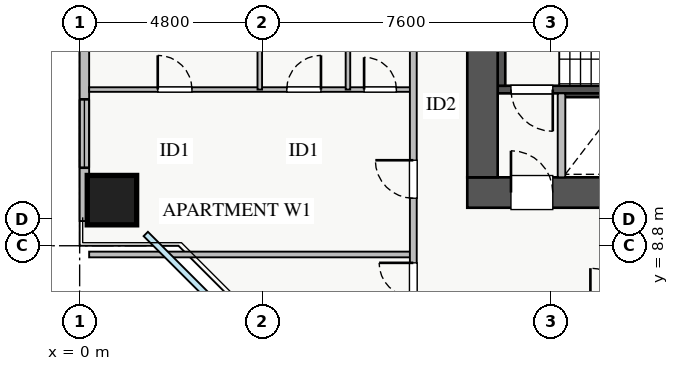
"""IFC4 building model, lengths in metres.
Left out: names, types, materials, properties, quantities, classifications, styles, units other than length and angle.
Written with IfcOpenShell. Run it as: python <this file> out.ifc"""

import sys

from ifc_helpers import new_model, si_unit, direction, frame, frame_2d, origin, origin_2d, place, context, subcontext, project, spatial, rectangle, extrude, source, transform, mapped, element, fill, save


model = new_model("IFC4")
c1 = context("Model", 3, precision=1e-05, world=origin(), true_north=direction((0.0, 1.0)))
c2 = subcontext(c1, "Body", "Model", "MODEL_VIEW")
j1 = project(units=[si_unit("LENGTHUNIT", "METRE"), si_unit("PLANEANGLEUNIT", "RADIAN")], contexts=[c1])
p1 = place(None, origin())
s1 = spatial("IfcSite", under=j1, at=p1, CompositionType="ELEMENT")
p2 = place(p1, origin())
s2 = spatial("IfcBuilding", under=s1, at=p2, CompositionType="ELEMENT")
p3 = place(p2, frame((0.0, 0.0, 73.0)))
s3 = spatial("IfcBuildingStorey", under=s2, at=p3, CompositionType="ELEMENT", Elevation=73.0)
p4 = place(p3, frame((12.68, 12.8, 0.0), z_axis=(0.0, 0.0, 1.0), x_axis=(1.0, 0.0, 0.0)))
e1 = element("IfcWall", 1, at=p4, inside=s3, PredefinedType="SHEAR", context=c2, shape_type="SweptSolid", body=[
    extrude(rectangle(XDim=1.94, YDim=0.18, at=frame_2d((0.97, 0.0))), origin(), (0.0, 0.0, 1.0), 3.07),
])
p5 = place(p3, frame((11.0, 12.91, 0.0), z_axis=(0.0, 0.0, 1.0), x_axis=(1.0, 0.0, 0.0)))
e2 = element("IfcWall", 2, at=p5, inside=s3, PredefinedType="SHEAR", context=c2, shape_type="SweptSolid", body=[
    extrude(rectangle(XDim=7.15, YDim=0.2, at=frame_2d((3.575, 0.0))), origin(), (0.0, 0.0, 1.0), 3.25),
])
p6 = place(p5, frame((0.35, 0.0, 0.0)))
e3 = element("IfcOpeningElement", 3, at=p6, cuts=e2, PredefinedType="OPENING", context=c2, shape_type="SweptSolid", body=[
    extrude(rectangle(XDim=1.1, YDim=2.05, at=frame_2d((0.55, 1.025))), frame((0.0, 0.11, 0.0), z_axis=(0.0, -1.0, 0.0), x_axis=(1.0, 0.0, 0.0)), (0.0, 0.0, 1.0), 0.22),
])
p7 = place(p3, frame((11.1, 13.01, 0.0), z_axis=(0.0, 0.0, 1.0), x_axis=(0.0, 1.0, 0.0)))
e4 = element("IfcWall", 4, at=p7, inside=s3, PredefinedType="SHEAR", context=c2, shape_type="SweptSolid", body=[
    extrude(rectangle(XDim=2.94, YDim=0.2, at=frame_2d((1.47, 0.0))), origin(), (0.0, 0.0, 1.0), 3.25),
])
p8 = place(p3, frame((10.2, 10.2, 0.0), z_axis=(0.0, 0.0, 1.0), x_axis=(1.0, 0.0, 0.0)))
e5 = element("IfcWall", 5, at=p8, inside=s3, PredefinedType="SHEAR", context=c2, shape_type="SweptSolid", body=[
    extrude(rectangle(XDim=17.6, YDim=0.8, at=frame_2d((8.8, 0.0))), origin(), (0.0, 0.0, 1.0), 3.25),
])
p9 = place(p8, frame((1.15, 0.0, 0.0)))
e6 = element("IfcOpeningElement", 6, at=p9, cuts=e5, PredefinedType="OPENING", context=c2, shape_type="SweptSolid", body=[
    extrude(rectangle(XDim=1.1, YDim=2.05, at=frame_2d((0.55, 1.025))), frame((0.0, 0.41, 0.0), z_axis=(0.0, -1.0, 0.0), x_axis=(1.0, 0.0, 0.0)), (0.0, 0.0, 1.0), 0.82),
])
p10 = place(p8, frame((8.3, 0.0, 0.0)))
e7 = element("IfcOpeningElement", 7, at=p10, cuts=e5, PredefinedType="OPENING", context=c2, shape_type="SweptSolid", body=[
    extrude(rectangle(XDim=1.1, YDim=2.05, at=frame_2d((0.55, 1.025))), frame((0.0, 0.41, 0.0), z_axis=(0.0, -1.0, 0.0), x_axis=(1.0, 0.0, 0.0)), (0.0, 0.0, 1.0), 0.82),
])
p11 = place(p8, frame((10.05, 0.0, 0.0)))
e8 = element("IfcOpeningElement", 8, at=p11, cuts=e5, PredefinedType="OPENING", context=c2, shape_type="SweptSolid", body=[
    extrude(rectangle(XDim=1.1, YDim=2.05, at=frame_2d((0.55, 1.025))), frame((0.0, 0.41, 0.0), z_axis=(0.0, -1.0, 0.0), x_axis=(1.0, 0.0, 0.0)), (0.0, 0.0, 1.0), 0.82),
])
p12 = place(p8, frame((14.74, 0.0, 0.0)))
e9 = element("IfcOpeningElement", 9, at=p12, cuts=e5, PredefinedType="OPENING", context=c2, shape_type="SweptSolid", body=[
    extrude(rectangle(XDim=1.0, YDim=2.05, at=frame_2d((0.5, 1.025))), frame((0.0, 0.41, 0.0), z_axis=(0.0, -1.0, 0.0), x_axis=(1.0, 0.0, 0.0)), (0.0, 0.0, 1.0), 0.82),
])
p13 = place(p8, frame((11.835, 0.0, 0.0)))
e10 = element("IfcOpeningElement", 10, at=p13, cuts=e5, PredefinedType="OPENING", context=c2, shape_type="SweptSolid", body=[
    extrude(rectangle(XDim=1.0, YDim=2.05, at=frame_2d((0.5, 1.025))), frame((0.0, 0.41, 0.0), z_axis=(0.0, -1.0, 0.0), x_axis=(1.0, 0.0, 0.0)), (0.0, 0.0, 1.0), 0.82),
])
p14 = place(p8, frame((13.37, 0.0, 0.0)))
e11 = element("IfcOpeningElement", 11, at=p14, cuts=e5, PredefinedType="OPENING", context=c2, shape_type="SweptSolid", body=[
    extrude(rectangle(XDim=1.0, YDim=2.05, at=frame_2d((0.5, 1.025))), frame((0.0, 0.41, 0.0), z_axis=(0.0, -1.0, 0.0), x_axis=(1.0, 0.0, 0.0)), (0.0, 0.0, 1.0), 0.82),
])
p15 = place(p3, frame((10.6, 10.6, 0.0), z_axis=(0.0, 0.0, 1.0), x_axis=(0.0, 1.0, 0.0)))
e12 = element("IfcWall", 12, at=p15, inside=s3, PredefinedType="SHEAR", context=c2, shape_type="SweptSolid", body=[
    extrude(rectangle(XDim=5.6, YDim=0.8, at=frame_2d((2.8, 0.0))), origin(), (0.0, 0.0, 1.0), 3.25),
])
m1 = source(origin(), c2, "Body", "SweptSolid", [
    extrude(rectangle(XDim=1.3, YDim=1.3, at=origin_2d()), origin(), (0.0, 0.0, 1.0), 3.25),
])
p16 = place(p3, frame((0.85, 10.0, 0.0), z_axis=(0.0, 0.0, 1.0), x_axis=(1.0, 0.0, 0.0)))
e13 = element("IfcColumn", 13, at=p16, inside=s3, PredefinedType="COLUMN", context=c2, shape_type="MappedRepresentation", body=[
    mapped(m1, transform((0.0, 0.0, 0.0), x_axis=(1.0, 0.0, 0.0), y_axis=(0.0, 1.0, 0.0), z_axis=(0.0, 0.0, 1.0), scale=1.0)),
])
p17 = place(p3, frame((0.125, 9.45, 0.0), z_axis=(0.0, 0.0, 1.0), x_axis=(0.0, 1.0, 0.0)))
e14 = element("IfcWall", 14, at=p17, inside=s3, PredefinedType="STANDARD", context=c2, shape_type="SweptSolid", body=[
    extrude(rectangle(XDim=27.1, YDim=0.25, at=frame_2d((13.55, 0.0))), origin(), (0.0, 0.0, 1.0), 2.61),
])
p18 = place(p17, frame((14.4, 0.0, 0.0)))
e15 = element("IfcOpeningElement", 15, at=p18, cuts=e14, PredefinedType="OPENING", context=c2, shape_type="SweptSolid", body=[
    extrude(rectangle(XDim=1.2, YDim=2.1, at=frame_2d((0.6, 1.05))), frame((0.0, 0.135, 0.0), z_axis=(0.0, -1.0, 0.0), x_axis=(1.0, 0.0, 0.0)), (0.0, 0.0, 1.0), 0.27),
])
p19 = place(p17, frame((1.403, 0.0, 0.9)))
e16 = element("IfcOpeningElement", 16, at=p19, cuts=e14, PredefinedType="OPENING", context=c2, shape_type="SweptSolid", body=[
    extrude(rectangle(XDim=1.8, YDim=1.5, at=frame_2d((0.9, 0.75))), frame((0.0, 0.135, 0.0), z_axis=(0.0, -1.0, 0.0), x_axis=(1.0, 0.0, 0.0)), (0.0, 0.0, 1.0), 0.27),
])
p20 = place(p17, frame((22.663, 0.0, 0.9)))
e17 = element("IfcOpeningElement", 17, at=p20, cuts=e14, PredefinedType="OPENING", context=c2, shape_type="SweptSolid", body=[
    extrude(rectangle(XDim=2.1, YDim=1.48, at=frame_2d((1.05, 0.74))), frame((0.0, 0.135, 0.0), z_axis=(0.0, -1.0, 0.0), x_axis=(1.0, 0.0, 0.0)), (0.0, 0.0, 1.0), 0.27),
])
p21 = place(p17, frame((4.607, 0.0, 0.9)))
e18 = element("IfcOpeningElement", 18, at=p21, cuts=e14, PredefinedType="OPENING", context=c2, shape_type="SweptSolid", body=[
    extrude(rectangle(XDim=2.4, YDim=1.5, at=frame_2d((1.2, 0.75))), frame((0.0, 0.135, 0.0), z_axis=(0.0, -1.0, 0.0), x_axis=(1.0, 0.0, 0.0)), (0.0, 0.0, 1.0), 0.27),
])
p22 = place(p17, frame((13.17, 0.0, 0.9)))
e19 = element("IfcOpeningElement", 19, at=p22, cuts=e14, PredefinedType="OPENING", context=c2, shape_type="SweptSolid", body=[
    extrude(rectangle(XDim=0.9, YDim=1.2, at=frame_2d((0.45, 0.6))), frame((0.0, 0.135, 0.0), z_axis=(0.0, -1.0, 0.0), x_axis=(1.0, 0.0, 0.0)), (0.0, 0.0, 1.0), 0.27),
])
p23 = place(p17, frame((8.405, 0.0, 0.9)))
e20 = element("IfcOpeningElement", 20, at=p23, cuts=e14, PredefinedType="OPENING", context=c2, shape_type="SweptSolid", body=[
    extrude(rectangle(XDim=0.9, YDim=1.2, at=frame_2d((0.45, 0.6))), frame((0.0, 0.135, 0.0), z_axis=(0.0, -1.0, 0.0), x_axis=(1.0, 0.0, 0.0)), (0.0, 0.0, 1.0), 0.27),
])
p24 = place(p3, frame((12.68, 10.6, 0.0), z_axis=(0.0, 0.0, 1.0), x_axis=(0.0, 1.0, 0.0)))
e21 = element("IfcWall", 21, at=p24, inside=s3, PredefinedType="PARTITIONING", context=c2, shape_type="SweptSolid", body=[
    extrude(rectangle(XDim=2.21, YDim=0.2, at=frame_2d((1.105, 0.0))), origin(), (0.0, 0.0, 1.0), 3.07),
])
p25 = place(p3, frame((0.25, 8.57, 0.0), z_axis=(0.0, 0.0, 1.0), x_axis=(1.0, 0.0, 0.0)))
e22 = element("IfcWall", 22, at=p25, inside=s3, PredefinedType="PARTITIONING", context=c2, shape_type="SweptSolid", body=[
    extrude(rectangle(XDim=8.53, YDim=0.15, at=frame_2d((4.265, 0.0))), origin(), (0.0, 0.0, 1.0), 3.07),
])
p26 = place(p3, frame((0.25, 12.91, 0.0), z_axis=(0.0, 0.0, 1.0), x_axis=(1.0, 0.0, 0.0)))
e23 = element("IfcWall", 23, at=p26, inside=s3, PredefinedType="PLUMBINGWALL", context=c2, shape_type="SweptSolid", body=[
    extrude(rectangle(XDim=8.53, YDim=0.12, at=frame_2d((4.265, 0.0))), origin(), (0.0, 0.0, 1.0), 3.07),
])
p27 = place(p26, frame((1.805, 0.0, 0.0)))
e24 = element("IfcOpeningElement", 24, at=p27, cuts=e23, PredefinedType="OPENING", context=c2, shape_type="SweptSolid", body=[
    extrude(rectangle(XDim=0.9, YDim=2.05, at=frame_2d((0.45, 1.025))), frame((0.0, 0.07, 0.0), z_axis=(0.0, -1.0, 0.0), x_axis=(1.0, 0.0, 0.0)), (0.0, 0.0, 1.0), 0.14),
])
p28 = place(p26, frame((5.2, 0.0, 0.0)))
e25 = element("IfcOpeningElement", 25, at=p28, cuts=e23, PredefinedType="OPENING", context=c2, shape_type="SweptSolid", body=[
    extrude(rectangle(XDim=0.9, YDim=2.05, at=frame_2d((0.45, 1.025))), frame((0.0, 0.07, 0.0), z_axis=(0.0, -1.0, 0.0), x_axis=(1.0, 0.0, 0.0)), (0.0, 0.0, 1.0), 0.14),
])
p29 = place(p26, frame((7.235, 0.0, 0.0)))
e26 = element("IfcOpeningElement", 26, at=p29, cuts=e23, PredefinedType="OPENING", context=c2, shape_type="SweptSolid", body=[
    extrude(rectangle(XDim=0.85, YDim=2.05, at=frame_2d((0.425, 1.025))), frame((0.0, 0.07, 0.0), z_axis=(0.0, -1.0, 0.0), x_axis=(1.0, 0.0, 0.0)), (0.0, 0.0, 1.0), 0.14),
])
for number, where, z_axis, x_axis in (
    (27, (4.74, 12.91, 0.0), (0.0, 0.0, 1.0), (0.0, 1.0, 0.0)),
    (28, (7.06, 12.91, 0.0), (0.0, 0.0, 1.0), (0.0, 1.0, 0.0)),
):
    element("IfcWall", number, at=place(p3, frame(where, z_axis=z_axis, x_axis=x_axis)), inside=s3, PredefinedType="PLUMBINGWALL", context=c2, shape_type="SweptSolid", body=[
        extrude(rectangle(XDim=4.71, YDim=0.12, at=frame_2d((2.355, 0.0))), origin(), (0.0, 0.0, 1.0), 3.07),
    ])
p30 = place(p3, frame((8.78, 7.21, 0.0), z_axis=(0.0, 0.0, 1.0), x_axis=(0.0, 1.0, 0.0)))
e29 = element("IfcWall", 29, at=p30, inside=s3, PredefinedType="PARTITIONING", context=c2, shape_type="SweptSolid", body=[
    extrude(rectangle(XDim=31.23, YDim=0.18, at=frame_2d((15.615, 0.0))), origin(), (0.0, 0.0, 1.0), 3.07),
])
p31 = place(p30, frame((30.09, 0.0, 0.0)))
e30 = element("IfcOpeningElement", 30, at=p31, cuts=e29, PredefinedType="OPENING", context=c2, shape_type="SweptSolid", body=[
    extrude(rectangle(XDim=0.9, YDim=2.05, at=frame_2d((0.45, 1.025))), frame((0.0, 0.1, 0.0), z_axis=(0.0, -1.0, 0.0), x_axis=(1.0, 0.0, 0.0)), (0.0, 0.0, 1.0), 0.2),
])
p32 = place(p30, frame((0.24, 0.0, 0.0)))
e31 = element("IfcOpeningElement", 31, at=p32, cuts=e29, PredefinedType="OPENING", context=c2, shape_type="SweptSolid", body=[
    extrude(rectangle(XDim=0.9, YDim=2.05, at=frame_2d((0.45, 1.025))), frame((0.0, 0.1, 0.0), z_axis=(0.0, -1.0, 0.0), x_axis=(1.0, 0.0, 0.0)), (0.0, 0.0, 1.0), 0.2),
])
p33 = place(p30, frame((2.84, 0.0, 0.0)))
e32 = element("IfcOpeningElement", 32, at=p33, cuts=e29, PredefinedType="OPENING", context=c2, shape_type="SweptSolid", body=[
    extrude(rectangle(XDim=1.0, YDim=2.05, at=frame_2d((0.5, 1.025))), frame((0.0, 0.1, 0.0), z_axis=(0.0, -1.0, 0.0), x_axis=(1.0, 0.0, 0.0)), (0.0, 0.0, 1.0), 0.2),
])
p34 = place(p30, frame((12.11, 0.0, 0.0)))
e33 = element("IfcOpeningElement", 33, at=p34, cuts=e29, PredefinedType="OPENING", context=c2, shape_type="SweptSolid", body=[
    extrude(rectangle(XDim=1.0, YDim=2.05, at=frame_2d((0.5, 1.025))), frame((0.0, 0.1, 0.0), z_axis=(0.0, -1.0, 0.0), x_axis=(1.0, 0.0, 0.0)), (0.0, 0.0, 1.0), 0.2),
])
p35 = place(p30, frame((24.62, 0.0, 0.0)))
e34 = element("IfcOpeningElement", 34, at=p35, cuts=e29, PredefinedType="OPENING", context=c2, shape_type="SweptSolid", body=[
    extrude(rectangle(XDim=1.0, YDim=2.05, at=frame_2d((0.5, 1.025))), frame((0.0, 0.1, 0.0), z_axis=(0.0, -1.0, 0.0), x_axis=(1.0, 0.0, 0.0)), (0.0, 0.0, 1.0), 0.2),
])
m2 = source(origin(), c2, "Body", "SweptSolid", [
    extrude(rectangle(XDim=1.8, YDim=1.5, at=frame_2d((0.9, 0.75))), frame((0.0, 0.03, 0.0), z_axis=(0.0, -1.0, 0.0), x_axis=(1.0, 0.0, 0.0)), (0.0, 0.0, 1.0), 0.06),
])
p36 = place(p19, origin())
e35 = element("IfcWindow", 35, at=p36, inside=s3, PartitioningType="TRIPLE_PANEL_VERTICAL", PredefinedType="WINDOW", context=c2, shape_type="MappedRepresentation", body=[
    mapped(m2, transform((0.0, 0.0, 0.0), x_axis=(1.0, 0.0, 0.0), y_axis=(0.0, 1.0, 0.0), z_axis=(0.0, 0.0, 1.0), scale=1.0)),
])
fill(e16, e35)
m3 = source(origin(), c2, "Body", "SweptSolid", [
    extrude(rectangle(XDim=1.1, YDim=2.05, at=frame_2d((0.55, 1.025))), frame((0.0, 0.025, 0.0), z_axis=(0.0, -1.0, 0.0), x_axis=(1.0, 0.0, 0.0)), (0.0, 0.0, 1.0), 0.05),
])
p37 = place(p9, origin())
e36 = element("IfcDoor", 36, at=p37, inside=s3, OperationType="SINGLE_SWING_LEFT", PredefinedType="DOOR", context=c2, shape_type="MappedRepresentation", body=[
    mapped(m3, transform((0.0, 0.0, 0.0), x_axis=(1.0, 0.0, 0.0), y_axis=(0.0, 1.0, 0.0), z_axis=(0.0, 0.0, 1.0), scale=1.0)),
])
fill(e6, e36)
p38 = place(p6, frame((1.1, 0.0, 0.0), z_axis=(0.0, 0.0, 1.0), x_axis=(-1.0, 0.0, 0.0)))
e37 = element("IfcDoor", 37, at=p38, inside=s3, OperationType="SINGLE_SWING_RIGHT", PredefinedType="DOOR", context=c2, shape_type="MappedRepresentation", body=[
    mapped(m3, transform((0.0, 0.0, 0.0), x_axis=(1.0, 0.0, 0.0), y_axis=(0.0, 1.0, 0.0), z_axis=(0.0, 0.0, 1.0), scale=1.0)),
])
fill(e3, e37)
m4 = source(origin(), c2, "Body", "SweptSolid", [
    extrude(rectangle(XDim=0.9, YDim=2.05, at=frame_2d((0.45, 1.025))), frame((0.0, 0.025, 0.0), z_axis=(0.0, -1.0, 0.0), x_axis=(1.0, 0.0, 0.0)), (0.0, 0.0, 1.0), 0.05),
])
p39 = place(p27, origin())
e38 = element("IfcDoor", 38, at=p39, inside=s3, OperationType="SINGLE_SWING_LEFT", PredefinedType="DOOR", context=c2, shape_type="MappedRepresentation", body=[
    mapped(m4, transform((0.0, 0.0, 0.0), x_axis=(1.0, 0.0, 0.0), y_axis=(0.0, 1.0, 0.0), z_axis=(0.0, 0.0, 1.0), scale=1.0)),
])
fill(e24, e38)
p40 = place(p28, origin())
e39 = element("IfcDoor", 39, at=p40, inside=s3, OperationType="SINGLE_SWING_RIGHT", PredefinedType="DOOR", context=c2, shape_type="MappedRepresentation", body=[
    mapped(m4, transform((0.0, 0.0, 0.0), x_axis=(1.0, 0.0, 0.0), y_axis=(0.0, 1.0, 0.0), z_axis=(0.0, 0.0, 1.0), scale=1.0)),
])
fill(e25, e39)
m5 = source(origin(), c2, "Body", "SweptSolid", [
    extrude(rectangle(XDim=0.85, YDim=2.05, at=frame_2d((0.425, 1.025))), frame((0.0, 0.025, 0.0), z_axis=(0.0, -1.0, 0.0), x_axis=(1.0, 0.0, 0.0)), (0.0, 0.0, 1.0), 0.05),
])
p41 = place(p29, origin())
e40 = element("IfcDoor", 40, at=p41, inside=s3, OperationType="SINGLE_SWING_LEFT", PredefinedType="DOOR", context=c2, shape_type="MappedRepresentation", body=[
    mapped(m5, transform((0.0, 0.0, 0.0), x_axis=(1.0, 0.0, 0.0), y_axis=(0.0, 1.0, 0.0), z_axis=(0.0, 0.0, 1.0), scale=1.0)),
])
fill(e26, e40)
p42 = place(p32, origin())
e41 = element("IfcDoor", 41, at=p42, inside=s3, OperationType="SINGLE_SWING_RIGHT", PredefinedType="DOOR", context=c2, shape_type="MappedRepresentation", body=[
    mapped(m4, transform((0.0, 0.0, 0.0), x_axis=(1.0, 0.0, 0.0), y_axis=(0.0, 1.0, 0.0), z_axis=(0.0, 0.0, 1.0), scale=1.0)),
])
fill(e31, e41)
m6 = source(origin(), c2, "Body", "SweptSolid", [
    extrude(rectangle(XDim=1.0, YDim=2.05, at=frame_2d((0.5, 1.025))), frame((0.0, 0.025, 0.0), z_axis=(0.0, -1.0, 0.0), x_axis=(1.0, 0.0, 0.0)), (0.0, 0.0, 1.0), 0.05),
])
p43 = place(p33, origin())
e42 = element("IfcDoor", 42, at=p43, inside=s3, OperationType="SINGLE_SWING_RIGHT", PredefinedType="DOOR", context=c2, shape_type="MappedRepresentation", body=[
    mapped(m6, transform((0.0, 0.0, 0.0), x_axis=(1.0, 0.0, 0.0), y_axis=(0.0, 1.0, 0.0), z_axis=(0.0, 0.0, 1.0), scale=1.0)),
])
fill(e32, e42)
save(model, sys.argv[1])
